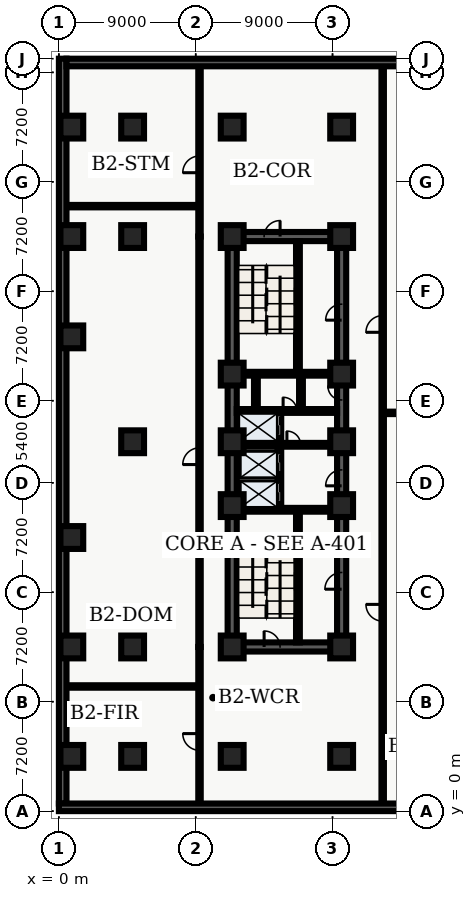
"""IFC4 building model, lengths in metres.
Left out: names, types, materials, properties, quantities, classifications, styles, units other than length and angle.
Written with IfcOpenShell. Run it as: python <this file> out.ifc"""

import sys

from ifc_helpers import new_model, entity, si_unit, converted_unit, direction, frame, origin_with_axes, origin_2d_with_axis, place, context, subcontext, project, spatial, polyline, rectangle, outline, extrude, element, fill, save


model = new_model("IFC4")
c1 = context("Model", 3, precision=1e-05, world=origin_with_axes(), true_north=direction((0.0, 1.0)))
c2 = subcontext(c1, "Body", "Model", "MODEL_VIEW")
j1 = project(units=[si_unit("LENGTHUNIT", "METRE"), converted_unit("PLANEANGLEUNIT", "DEGREE", entity("IfcPlaneAngleMeasure", 0.017), si_unit("PLANEANGLEUNIT", "RADIAN"), dimensions=[0, 0, 0, 0, 0, 0, 0])], contexts=[c1])
p1 = place(None, origin_with_axes())
s1 = spatial("IfcSite", under=j1, at=p1, CompositionType="ELEMENT")
p2 = place(p1, origin_with_axes())
s2 = spatial("IfcBuilding", under=s1, at=p2, CompositionType="ELEMENT")
p3 = place(p2, frame((0.0, 0.0, -10.2), z_axis=(0.0, 0.0, 1.0), x_axis=(1.0, 0.0, 0.0)))
s3 = spatial("IfcBuildingStorey", under=s2, at=p3, CompositionType="ELEMENT", Elevation=-10.2)
p4 = place(p3, frame((11.4, 10.8, 0.0), z_axis=(0.0, 0.0, 1.0), x_axis=(0.0, 1.0, 0.0)))
e1 = element("IfcWall", 1, at=p4, inside=s3, PredefinedType="SHEAR", context=c2, shape_type="SweptSolid", body=[
    extrude(outline(polyline([(0.0, -0.3), (27.0, -0.3), (27.0, 0.3), (0.0, 0.3), (0.0, -0.3)])), origin_with_axes(), (0.0, 0.0, 1.0), 5.08),
])
p5 = place(p3, frame((11.4, 10.8, 0.0), z_axis=(0.0, 0.0, 1.0), x_axis=(1.0, 0.0, 0.0)))
e2 = element("IfcWall", 2, at=p5, inside=s3, PredefinedType="SHEAR", context=c2, shape_type="SweptSolid", body=[
    extrude(outline(polyline([(0.0, -0.3), (7.2, -0.3), (7.2, 0.3), (0.0, 0.3), (0.0, -0.3)])), origin_with_axes(), (0.0, 0.0, 1.0), 5.08),
])
p6 = place(p5, frame((2.625, 0.0, 0.0), z_axis=(0.0, 0.0, 1.0), x_axis=(1.0, 0.0, 0.0)))
e3 = element("IfcOpeningElement", 3, at=p6, cuts=e2, PredefinedType="OPENING", context=c2, shape_type="SweptSolid", body=[
    extrude(rectangle(XDim=1.05, YDim=0.62, at=origin_2d_with_axis()), origin_with_axes(), (0.0, 0.0, 1.0), 2.15),
])
p7 = place(p3, frame((11.4, 37.8, 0.0), z_axis=(0.0, 0.0, 1.0), x_axis=(1.0, 0.0, 0.0)))
e4 = element("IfcWall", 4, at=p7, inside=s3, PredefinedType="SHEAR", context=c2, shape_type="SweptSolid", body=[
    extrude(outline(polyline([(0.0, -0.3), (7.2, -0.3), (7.2, 0.3), (0.0, 0.3), (0.0, -0.3)])), origin_with_axes(), (0.0, 0.0, 1.0), 5.08),
])
p8 = place(p7, frame((2.625, 0.0, 0.0), z_axis=(0.0, 0.0, 1.0), x_axis=(1.0, 0.0, 0.0)))
e5 = element("IfcOpeningElement", 5, at=p8, cuts=e4, PredefinedType="OPENING", context=c2, shape_type="SweptSolid", body=[
    extrude(rectangle(XDim=1.05, YDim=0.62, at=origin_2d_with_axis()), origin_with_axes(), (0.0, 0.0, 1.0), 2.15),
])
p9 = place(p3, frame((18.6, 10.8, 0.0), z_axis=(0.0, 0.0, 1.0), x_axis=(0.0, 1.0, 0.0)))
e6 = element("IfcWall", 6, at=p9, inside=s3, PredefinedType="SHEAR", context=c2, shape_type="SweptSolid", body=[
    extrude(outline(polyline([(0.0, -0.3), (13.5, -0.3), (13.5, 0.3), (0.0, 0.3), (0.0, -0.3)])), origin_with_axes(), (0.0, 0.0, 1.0), 5.08),
])
p10 = place(p9, frame((11.125, 0.0, 0.0), z_axis=(0.0, 0.0, 1.0), x_axis=(1.0, 0.0, 0.0)))
e7 = element("IfcOpeningElement", 7, at=p10, cuts=e6, PredefinedType="OPENING", context=c2, shape_type="SweptSolid", body=[
    extrude(rectangle(XDim=1.05, YDim=0.62, at=origin_2d_with_axis()), origin_with_axes(), (0.0, 0.0, 1.0), 2.15),
])
p11 = place(p9, frame((4.35, 0.0, 0.0), z_axis=(0.0, 0.0, 1.0), x_axis=(1.0, 0.0, 0.0)))
e8 = element("IfcOpeningElement", 8, at=p11, cuts=e6, PredefinedType="OPENING", context=c2, shape_type="SweptSolid", body=[
    extrude(rectangle(XDim=1.1, YDim=0.62, at=origin_2d_with_axis()), origin_with_axes(), (0.0, 0.0, 1.0), 2.15),
])
p12 = place(p3, frame((18.6, 24.3, 0.0), z_axis=(0.0, 0.0, 1.0), x_axis=(0.0, 1.0, 0.0)))
e9 = element("IfcWall", 9, at=p12, inside=s3, PredefinedType="SHEAR", context=c2, shape_type="SweptSolid", body=[
    extrude(outline(polyline([(0.0, -0.3), (13.5, -0.3), (13.5, 0.3), (0.0, 0.3), (0.0, -0.3)])), origin_with_axes(), (0.0, 0.0, 1.0), 5.08),
])
p13 = place(p12, frame((3.2, 0.0, 0.0), z_axis=(0.0, 0.0, 1.0), x_axis=(1.0, 0.0, 0.0)))
e10 = element("IfcOpeningElement", 10, at=p13, cuts=e9, PredefinedType="OPENING", context=c2, shape_type="SweptSolid", body=[
    extrude(rectangle(XDim=0.9, YDim=0.62, at=origin_2d_with_axis()), origin_with_axes(), (0.0, 0.0, 1.0), 2.15),
])
p14 = place(p12, frame((8.525, 0.0, 0.0), z_axis=(0.0, 0.0, 1.0), x_axis=(1.0, 0.0, 0.0)))
e11 = element("IfcOpeningElement", 11, at=p14, cuts=e9, PredefinedType="OPENING", context=c2, shape_type="SweptSolid", body=[
    extrude(rectangle(XDim=1.05, YDim=0.62, at=origin_2d_with_axis()), origin_with_axes(), (0.0, 0.0, 1.0), 2.15),
])
p15 = place(p3, frame((15.725, 11.1, 0.0), z_axis=(0.0, 0.0, 1.0), x_axis=(0.0, 1.0, 0.0)))
e12 = element("IfcWall", 12, at=p15, inside=s3, PredefinedType="SHEAR", context=c2, shape_type="SweptSolid", body=[
    extrude(outline(polyline([(0.0, -0.125), (8.6, -0.125), (8.6, 0.125), (0.0, 0.125), (0.0, -0.125)])), origin_with_axes(), (0.0, 0.0, 1.0), 5.08),
])
p16 = place(p3, frame((11.7, 19.825, 0.0), z_axis=(0.0, 0.0, 1.0), x_axis=(1.0, 0.0, 0.0)))
e13 = element("IfcWall", 13, at=p16, inside=s3, PredefinedType="SHEAR", context=c2, shape_type="SweptSolid", body=[
    extrude(outline(polyline([(0.0, -0.125), (6.6, -0.125), (6.6, 0.125), (0.0, 0.125), (0.0, -0.125)])), origin_with_axes(), (0.0, 0.0, 1.0), 5.08),
])
p17 = place(p3, frame((15.725, 28.9, 0.0), z_axis=(0.0, 0.0, 1.0), x_axis=(0.0, 1.0, 0.0)))
e14 = element("IfcWall", 14, at=p17, inside=s3, PredefinedType="SHEAR", context=c2, shape_type="SweptSolid", body=[
    extrude(outline(polyline([(0.0, -0.125), (8.6, -0.125), (8.6, 0.125), (0.0, 0.125), (0.0, -0.125)])), origin_with_axes(), (0.0, 0.0, 1.0), 5.08),
])
p18 = place(p3, frame((11.7, 28.775, 0.0), z_axis=(0.0, 0.0, 1.0), x_axis=(1.0, 0.0, 0.0)))
e15 = element("IfcWall", 15, at=p18, inside=s3, PredefinedType="SHEAR", context=c2, shape_type="SweptSolid", body=[
    extrude(outline(polyline([(0.0, -0.125), (6.6, -0.125), (6.6, 0.125), (0.0, 0.125), (0.0, -0.125)])), origin_with_axes(), (0.0, 0.0, 1.0), 5.08),
])
p19 = place(p3, frame((14.5, 19.95, 0.0), z_axis=(0.0, 0.0, 1.0), x_axis=(0.0, 1.0, 0.0)))
e16 = element("IfcWall", 16, at=p19, inside=s3, PredefinedType="SOLIDWALL", context=c2, shape_type="SweptSolid", body=[
    extrude(outline(polyline([(0.0, -0.125), (6.25, -0.125), (6.25, 0.125), (0.0, 0.125), (0.0, -0.125)])), origin_with_axes(), (0.0, 0.0, 1.0), 3.6),
])
p20 = place(p19, frame((1.025, 0.0, 0.0), z_axis=(0.0, 0.0, 1.0), x_axis=(1.0, 0.0, 0.0)))
e17 = element("IfcOpeningElement", 17, at=p20, cuts=e16, PredefinedType="OPENING", context=c2, shape_type="SweptSolid", body=[
    extrude(rectangle(XDim=1.1, YDim=0.27, at=origin_2d_with_axis()), origin_with_axes(), (0.0, 0.0, 1.0), 2.15),
])
p21 = place(p19, frame((2.975, 0.0, 0.0), z_axis=(0.0, 0.0, 1.0), x_axis=(1.0, 0.0, 0.0)))
e18 = element("IfcOpeningElement", 18, at=p21, cuts=e16, PredefinedType="OPENING", context=c2, shape_type="SweptSolid", body=[
    extrude(rectangle(XDim=1.1, YDim=0.27, at=origin_2d_with_axis()), origin_with_axes(), (0.0, 0.0, 1.0), 2.15),
])
p22 = place(p19, frame((5.425, 0.0, 0.0), z_axis=(0.0, 0.0, 1.0), x_axis=(1.0, 0.0, 0.0)))
e19 = element("IfcOpeningElement", 19, at=p22, cuts=e16, PredefinedType="OPENING", context=c2, shape_type="SweptSolid", body=[
    extrude(rectangle(XDim=1.2, YDim=0.27, at=origin_2d_with_axis()), origin_with_axes(), (0.0, 0.0, 1.0), 2.15),
])
p23 = place(p3, frame((11.7, 24.1, 0.0), z_axis=(0.0, 0.0, 1.0), x_axis=(1.0, 0.0, 0.0)))
e20 = element("IfcWall", 20, at=p23, inside=s3, PredefinedType="SOLIDWALL", context=c2, shape_type="SweptSolid", body=[
    extrude(outline(polyline([(0.0, -0.125), (6.6, -0.125), (6.6, 0.125), (0.0, 0.125), (0.0, -0.125)])), origin_with_axes(), (0.0, 0.0, 1.0), 3.6),
])
p24 = place(p23, frame((3.75, 0.0, 0.0), z_axis=(0.0, 0.0, 1.0), x_axis=(1.0, 0.0, 0.0)))
e21 = element("IfcOpeningElement", 21, at=p24, cuts=e20, PredefinedType="OPENING", context=c2, shape_type="SweptSolid", body=[
    extrude(rectangle(XDim=0.9, YDim=0.27, at=origin_2d_with_axis()), origin_with_axes(), (0.0, 0.0, 1.0), 2.15),
])
p25 = place(p3, frame((11.7, 26.325, 0.0), z_axis=(0.0, 0.0, 1.0), x_axis=(1.0, 0.0, 0.0)))
e22 = element("IfcWall", 22, at=p25, inside=s3, PredefinedType="SOLIDWALL", context=c2, shape_type="SweptSolid", body=[
    extrude(outline(polyline([(0.0, -0.125), (6.6, -0.125), (6.6, 0.125), (0.0, 0.125), (0.0, -0.125)])), origin_with_axes(), (0.0, 0.0, 1.0), 3.6),
])
p26 = place(p25, frame((3.5, 0.0, 0.0), z_axis=(0.0, 0.0, 1.0), x_axis=(1.0, 0.0, 0.0)))
e23 = element("IfcOpeningElement", 23, at=p26, cuts=e22, PredefinedType="OPENING", context=c2, shape_type="SweptSolid", body=[
    extrude(rectangle(XDim=0.9, YDim=0.27, at=origin_2d_with_axis()), origin_with_axes(), (0.0, 0.0, 1.0), 2.15),
])
for number, where, z_axis, x_axis in (
    (24, (12.96, 26.45, 0.0), (0.0, 0.0, 1.0), (0.0, 1.0, 0.0)),
    (25, (15.925, 26.45, 0.0), (0.0, 0.0, 1.0), (0.0, 1.0, 0.0)),
):
    element("IfcWall", number, at=place(p3, frame(where, z_axis=z_axis, x_axis=x_axis)), inside=s3, PredefinedType="SOLIDWALL", context=c2, shape_type="SweptSolid", body=[
        extrude(outline(polyline([(0.0, -0.125), (2.2, -0.125), (2.2, 0.125), (0.0, 0.125), (0.0, -0.125)])), origin_with_axes(), (0.0, 0.0, 1.0), 3.6),
    ])
for number, where, z_axis, x_axis in (
    (26, (11.4, 3.6, 0.0), (0.0, 0.0, 1.0), (1.0, 0.0, 0.0)),
    (27, (11.4, 10.8, 0.0), (0.0, 0.0, 1.0), (1.0, 0.0, 0.0)),
    (28, (11.4, 20.1, 0.0), (0.0, 0.0, 1.0), (1.0, 0.0, 0.0)),
    (29, (11.4, 24.3, 0.0), (0.0, 0.0, 1.0), (1.0, 0.0, 0.0)),
    (30, (11.4, 28.75, 0.0), (0.0, 0.0, 1.0), (1.0, 0.0, 0.0)),
    (31, (11.4, 37.8, 0.0), (0.0, 0.0, 1.0), (1.0, 0.0, 0.0)),
    (32, (11.4, 45.0, 0.0), (0.0, 0.0, 1.0), (1.0, 0.0, 0.0)),
    (33, (18.6, 3.6, 0.0), (0.0, 0.0, 1.0), (1.0, 0.0, 0.0)),
    (34, (18.6, 10.8, 0.0), (0.0, 0.0, 1.0), (1.0, 0.0, 0.0)),
    (35, (18.6, 20.1, 0.0), (0.0, 0.0, 1.0), (1.0, 0.0, 0.0)),
    (36, (18.6, 24.3, 0.0), (0.0, 0.0, 1.0), (1.0, 0.0, 0.0)),
    (37, (18.6, 28.75, 0.0), (0.0, 0.0, 1.0), (1.0, 0.0, 0.0)),
    (38, (18.6, 37.8, 0.0), (0.0, 0.0, 1.0), (1.0, 0.0, 0.0)),
    (39, (18.6, 45.0, 0.0), (0.0, 0.0, 1.0), (1.0, 0.0, 0.0)),
    (40, (4.85, 3.6, 0.0), (0.0, 0.0, 1.0), (1.0, 0.0, 0.0)),
    (41, (4.85, 10.8, 0.0), (0.0, 0.0, 1.0), (1.0, 0.0, 0.0)),
    (42, (4.85, 24.3, 0.0), (0.0, 0.0, 1.0), (1.0, 0.0, 0.0)),
    (43, (4.85, 37.8, 0.0), (0.0, 0.0, 1.0), (1.0, 0.0, 0.0)),
    (44, (4.85, 45.0, 0.0), (0.0, 0.0, 1.0), (1.0, 0.0, 0.0)),
    (45, (0.85, 3.6, 0.0), (0.0, 0.0, 1.0), (1.0, 0.0, 0.0)),
    (46, (0.85, 10.8, 0.0), (0.0, 0.0, 1.0), (1.0, 0.0, 0.0)),
    (47, (0.85, 18.0, 0.0), (0.0, 0.0, 1.0), (1.0, 0.0, 0.0)),
    (48, (0.85, 31.2, 0.0), (0.0, 0.0, 1.0), (1.0, 0.0, 0.0)),
    (49, (0.85, 37.8, 0.0), (0.0, 0.0, 1.0), (1.0, 0.0, 0.0)),
    (50, (0.85, 45.0, 0.0), (0.0, 0.0, 1.0), (1.0, 0.0, 0.0)),
):
    element("IfcColumn", number, at=place(p3, frame(where, z_axis=z_axis, x_axis=x_axis)), inside=s3, PredefinedType="COLUMN", context=c2, shape_type="SweptSolid", body=[
        extrude(rectangle(XDim=1.5, YDim=1.5, at=origin_2d_with_axis()), origin_with_axes(), (0.0, 0.0, 1.0), 5.4),
    ])
p27 = place(p3, frame((9.25, 0.5, 0.0), z_axis=(0.0, 0.0, 1.0), x_axis=(0.0, 1.0, 0.0)))
e51 = element("IfcWall", 51, at=p27, inside=s3, PredefinedType="PARTITIONING", context=c2, shape_type="SweptSolid", body=[
    extrude(outline(polyline([(0.0, -0.08), (10.3, -0.08), (10.3, 0.08), (0.0, 0.08), (0.0, -0.08)])), origin_with_axes(), (0.0, 0.0, 1.0), 3.2),
])
p28 = place(p27, frame((4.05, 0.0, 0.0), z_axis=(0.0, 0.0, 1.0), x_axis=(1.0, 0.0, 0.0)))
e52 = element("IfcOpeningElement", 52, at=p28, cuts=e51, PredefinedType="OPENING", context=c2, shape_type="SweptSolid", body=[
    extrude(rectangle(XDim=1.1, YDim=0.18, at=origin_2d_with_axis()), origin_with_axes(), (0.0, 0.0, 1.0), 2.15),
])
p29 = place(p3, frame((9.25, 37.8, 0.0), z_axis=(0.0, 0.0, 1.0), x_axis=(0.0, 1.0, 0.0)))
e53 = element("IfcWall", 53, at=p29, inside=s3, PredefinedType="PARTITIONING", context=c2, shape_type="SweptSolid", body=[
    extrude(outline(polyline([(0.0, -0.08), (11.2, -0.08), (11.2, 0.08), (0.0, 0.08), (0.0, -0.08)])), origin_with_axes(), (0.0, 0.0, 1.0), 3.2),
])
p30 = place(p29, frame((4.75, 0.0, 0.0), z_axis=(0.0, 0.0, 1.0), x_axis=(1.0, 0.0, 0.0)))
e54 = element("IfcOpeningElement", 54, at=p30, cuts=e53, PredefinedType="OPENING", context=c2, shape_type="SweptSolid", body=[
    extrude(rectangle(XDim=1.1, YDim=0.18, at=origin_2d_with_axis()), origin_with_axes(), (0.0, 0.0, 1.0), 2.15),
])
p31 = place(p3, frame((9.25, 10.8, 0.0), z_axis=(0.0, 0.0, 1.0), x_axis=(0.0, 1.0, 0.0)))
e55 = element("IfcWall", 55, at=p31, inside=s3, PredefinedType="PARTITIONING", context=c2, shape_type="SweptSolid", body=[
    extrude(outline(polyline([(0.0, -0.08), (27.0, -0.08), (27.0, 0.08), (0.0, 0.08), (0.0, -0.08)])), origin_with_axes(), (0.0, 0.0, 1.0), 3.2),
])
p32 = place(p31, frame((12.55, 0.0, 0.0), z_axis=(0.0, 0.0, 1.0), x_axis=(1.0, 0.0, 0.0)))
e56 = element("IfcOpeningElement", 56, at=p32, cuts=e55, PredefinedType="OPENING", context=c2, shape_type="SweptSolid", body=[
    extrude(rectangle(XDim=1.1, YDim=0.18, at=origin_2d_with_axis()), origin_with_axes(), (0.0, 0.0, 1.0), 2.15),
])
p33 = place(p3, frame((21.3, 0.5, 0.0), z_axis=(0.0, 0.0, 1.0), x_axis=(0.0, 1.0, 0.0)))
e57 = element("IfcWall", 57, at=p33, inside=s3, PredefinedType="PARTITIONING", context=c2, shape_type="SweptSolid", body=[
    extrude(outline(polyline([(0.0, -0.08), (48.5, -0.08), (48.5, 0.08), (0.0, 0.08), (0.0, -0.08)])), origin_with_axes(), (0.0, 0.0, 1.0), 3.2),
])
p34 = place(p33, frame((31.55, 0.0, 0.0), z_axis=(0.0, 0.0, 1.0), x_axis=(1.0, 0.0, 0.0)))
e58 = element("IfcOpeningElement", 58, at=p34, cuts=e57, PredefinedType="OPENING", context=c2, shape_type="SweptSolid", body=[
    extrude(rectangle(XDim=1.1, YDim=0.18, at=origin_2d_with_axis()), origin_with_axes(), (0.0, 0.0, 1.0), 2.15),
])
p35 = place(p33, frame((12.55, 0.0, 0.0), z_axis=(0.0, 0.0, 1.0), x_axis=(1.0, 0.0, 0.0)))
e59 = element("IfcOpeningElement", 59, at=p35, cuts=e57, PredefinedType="OPENING", context=c2, shape_type="SweptSolid", body=[
    extrude(rectangle(XDim=1.1, YDim=0.18, at=origin_2d_with_axis()), origin_with_axes(), (0.0, 0.0, 1.0), 2.15),
])
p36 = place(p3, frame((21.3, 26.2, 0.0), z_axis=(0.0, 0.0, 1.0), x_axis=(1.0, 0.0, 0.0)))
e60 = element("IfcWall", 60, at=p36, inside=s3, PredefinedType="PARTITIONING", context=c2, shape_type="SweptSolid", body=[
    extrude(outline(polyline([(0.0, -0.08), (61.6, -0.08), (61.6, 0.08), (0.0, 0.08), (0.0, -0.08)])), origin_with_axes(), (0.0, 0.0, 1.0), 3.2),
])
p37 = place(p36, frame((34.55, 0.0, 0.0), z_axis=(0.0, 0.0, 1.0), x_axis=(1.0, 0.0, 0.0)))
e61 = element("IfcOpeningElement", 61, at=p37, cuts=e60, PredefinedType="OPENING", context=c2, shape_type="SweptSolid", body=[
    extrude(rectangle(XDim=1.1, YDim=0.18, at=origin_2d_with_axis()), origin_with_axes(), (0.0, 0.0, 1.0), 2.15),
])
for number, where, z_axis, x_axis in (
    (62, (0.5, 8.2, 0.0), (0.0, 0.0, 1.0), (1.0, 0.0, 0.0)),
    (63, (0.5, 39.8, 0.0), (0.0, 0.0, 1.0), (1.0, 0.0, 0.0)),
):
    element("IfcWall", number, at=place(p3, frame(where, z_axis=z_axis, x_axis=x_axis)), inside=s3, PredefinedType="PARTITIONING", context=c2, shape_type="SweptSolid", body=[
        extrude(outline(polyline([(0.0, -0.08), (8.75, -0.08), (8.75, 0.08), (0.0, 0.08), (0.0, -0.08)])), origin_with_axes(), (0.0, 0.0, 1.0), 3.2),
    ])
p38 = place(p3, frame((0.25, 0.5, 0.0), z_axis=(0.0, 0.0, 1.0), x_axis=(0.0, 1.0, 0.0)))
e64 = element("IfcWall", 64, at=p38, inside=s3, PredefinedType="USERDEFINED", context=c2, shape_type="SweptSolid", body=[
    extrude(outline(polyline([(0.0, -0.25), (49.0, -0.25), (49.0, 0.25), (0.0, 0.25), (0.0, -0.25)])), origin_with_axes(), (0.0, 0.0, 1.0), 5.08),
])
for number, where, z_axis, x_axis in (
    (65, (0.5, 49.25, 0.0), (0.0, 0.0, 1.0), (1.0, 0.0, 0.0)),
    (66, (82.9, 0.25, 0.0), (0.0, 0.0, 1.0), (-1.0, 0.0, 0.0)),
):
    element("IfcWall", number, at=place(p3, frame(where, z_axis=z_axis, x_axis=x_axis)), inside=s3, PredefinedType="USERDEFINED", context=c2, shape_type="SweptSolid", body=[
        extrude(outline(polyline([(0.0, -0.25), (82.9, -0.25), (82.9, 0.25), (0.0, 0.25), (0.0, -0.25)])), origin_with_axes(), (0.0, 0.0, 1.0), 5.08),
    ])
p39 = place(p19, frame((1.025, 0.0, 0.0), z_axis=(0.0, 0.0, 1.0), x_axis=(1.0, 0.0, 0.0)))
e67 = element("IfcDoor", 67, at=p39, inside=s3, OperationType="SLIDING_TO_LEFT", PredefinedType="DOOR", context=c2, shape_type="SweptSolid", body=[
    extrude(rectangle(XDim=1.1, YDim=0.09, at=origin_2d_with_axis()), origin_with_axes(), (0.0, 0.0, 1.0), 2.15),
])
fill(e17, e67)
p40 = place(p19, frame((2.975, 0.0, 0.0), z_axis=(0.0, 0.0, 1.0), x_axis=(1.0, 0.0, 0.0)))
e68 = element("IfcDoor", 68, at=p40, inside=s3, OperationType="SLIDING_TO_RIGHT", PredefinedType="DOOR", context=c2, shape_type="SweptSolid", body=[
    extrude(rectangle(XDim=1.1, YDim=0.09, at=origin_2d_with_axis()), origin_with_axes(), (0.0, 0.0, 1.0), 2.15),
])
fill(e18, e68)
p41 = place(p19, frame((5.425, 0.0, 0.0), z_axis=(0.0, 0.0, 1.0), x_axis=(1.0, 0.0, 0.0)))
e69 = element("IfcDoor", 69, at=p41, inside=s3, OperationType="DOUBLE_DOOR_SLIDING", PredefinedType="DOOR", context=c2, shape_type="SweptSolid", body=[
    extrude(rectangle(XDim=1.2, YDim=0.09, at=origin_2d_with_axis()), origin_with_axes(), (0.0, 0.0, 1.0), 2.15),
])
fill(e19, e69)
p42 = place(p12, frame((3.2, 0.0, 0.0), z_axis=(0.0, 0.0, 1.0), x_axis=(1.0, 0.0, 0.0)))
e70 = element("IfcDoor", 70, at=p42, inside=s3, OperationType="SINGLE_SWING_RIGHT", PredefinedType="DOOR", context=c2, shape_type="SweptSolid", body=[
    extrude(rectangle(XDim=0.9, YDim=0.09, at=origin_2d_with_axis()), origin_with_axes(), (0.0, 0.0, 1.0), 2.15),
])
fill(e10, e70)
p43 = place(p5, frame((2.625, 0.0, 0.0), z_axis=(0.0, 0.0, 1.0), x_axis=(1.0, 0.0, 0.0)))
e71 = element("IfcDoor", 71, at=p43, inside=s3, OperationType="SINGLE_SWING_LEFT", PredefinedType="DOOR", context=c2, shape_type="SweptSolid", body=[
    extrude(rectangle(XDim=1.05, YDim=0.09, at=origin_2d_with_axis()), origin_with_axes(), (0.0, 0.0, 1.0), 2.15),
])
fill(e3, e71)
p44 = place(p7, frame((2.625, 0.0, 0.0), z_axis=(0.0, 0.0, 1.0), x_axis=(1.0, 0.0, 0.0)))
e72 = element("IfcDoor", 72, at=p44, inside=s3, OperationType="SINGLE_SWING_RIGHT", PredefinedType="DOOR", context=c2, shape_type="SweptSolid", body=[
    extrude(rectangle(XDim=1.05, YDim=0.09, at=origin_2d_with_axis()), origin_with_axes(), (0.0, 0.0, 1.0), 2.15),
])
fill(e5, e72)
p45 = place(p9, frame((11.125, 0.0, 0.0), z_axis=(0.0, 0.0, 1.0), x_axis=(1.0, 0.0, 0.0)))
e73 = element("IfcDoor", 73, at=p45, inside=s3, OperationType="SINGLE_SWING_LEFT", PredefinedType="DOOR", context=c2, shape_type="SweptSolid", body=[
    extrude(rectangle(XDim=1.05, YDim=0.09, at=origin_2d_with_axis()), origin_with_axes(), (0.0, 0.0, 1.0), 2.15),
])
fill(e7, e73)
p46 = place(p23, frame((3.75, 0.0, 0.0), z_axis=(0.0, 0.0, 1.0), x_axis=(1.0, 0.0, 0.0)))
e74 = element("IfcDoor", 74, at=p46, inside=s3, OperationType="SINGLE_SWING_LEFT", PredefinedType="DOOR", context=c2, shape_type="SweptSolid", body=[
    extrude(rectangle(XDim=0.9, YDim=0.09, at=origin_2d_with_axis()), origin_with_axes(), (0.0, 0.0, 1.0), 2.15),
])
fill(e21, e74)
p47 = place(p25, frame((3.5, 0.0, 0.0), z_axis=(0.0, 0.0, 1.0), x_axis=(1.0, 0.0, 0.0)))
e75 = element("IfcDoor", 75, at=p47, inside=s3, OperationType="SINGLE_SWING_LEFT", PredefinedType="DOOR", context=c2, shape_type="SweptSolid", body=[
    extrude(rectangle(XDim=0.9, YDim=0.09, at=origin_2d_with_axis()), origin_with_axes(), (0.0, 0.0, 1.0), 2.15),
])
fill(e23, e75)
p48 = place(p9, frame((4.35, 0.0, 0.0), z_axis=(0.0, 0.0, 1.0), x_axis=(1.0, 0.0, 0.0)))
e76 = element("IfcDoor", 76, at=p48, inside=s3, OperationType="SINGLE_SWING_LEFT", PredefinedType="DOOR", context=c2, shape_type="SweptSolid", body=[
    extrude(rectangle(XDim=1.1, YDim=0.09, at=origin_2d_with_axis()), origin_with_axes(), (0.0, 0.0, 1.0), 2.15),
])
fill(e8, e76)
p49 = place(p12, frame((8.525, 0.0, 0.0), z_axis=(0.0, 0.0, 1.0), x_axis=(1.0, 0.0, 0.0)))
e77 = element("IfcDoor", 77, at=p49, inside=s3, OperationType="SINGLE_SWING_LEFT", PredefinedType="DOOR", context=c2, shape_type="SweptSolid", body=[
    extrude(rectangle(XDim=1.05, YDim=0.09, at=origin_2d_with_axis()), origin_with_axes(), (0.0, 0.0, 1.0), 2.15),
])
fill(e11, e77)
p50 = place(p33, frame((31.55, 0.0, 0.0), z_axis=(0.0, 0.0, 1.0), x_axis=(1.0, 0.0, 0.0)))
e78 = element("IfcDoor", 78, at=p50, inside=s3, OperationType="SINGLE_SWING_LEFT", PredefinedType="DOOR", context=c2, shape_type="SweptSolid", body=[
    extrude(rectangle(XDim=1.1, YDim=0.09, at=origin_2d_with_axis()), origin_with_axes(), (0.0, 0.0, 1.0), 2.15),
])
fill(e58, e78)
p51 = place(p27, frame((4.05, 0.0, 0.0), z_axis=(0.0, 0.0, 1.0), x_axis=(1.0, 0.0, 0.0)))
e79 = element("IfcDoor", 79, at=p51, inside=s3, OperationType="SINGLE_SWING_RIGHT", PredefinedType="DOOR", context=c2, shape_type="SweptSolid", body=[
    extrude(rectangle(XDim=1.1, YDim=0.09, at=origin_2d_with_axis()), origin_with_axes(), (0.0, 0.0, 1.0), 2.15),
])
fill(e52, e79)
p52 = place(p31, frame((12.55, 0.0, 0.0), z_axis=(0.0, 0.0, 1.0), x_axis=(1.0, 0.0, 0.0)))
e80 = element("IfcDoor", 80, at=p52, inside=s3, OperationType="SINGLE_SWING_LEFT", PredefinedType="DOOR", context=c2, shape_type="SweptSolid", body=[
    extrude(rectangle(XDim=1.1, YDim=0.09, at=origin_2d_with_axis()), origin_with_axes(), (0.0, 0.0, 1.0), 2.15),
])
fill(e56, e80)
p53 = place(p29, frame((4.75, 0.0, 0.0), z_axis=(0.0, 0.0, 1.0), x_axis=(1.0, 0.0, 0.0)))
e81 = element("IfcDoor", 81, at=p53, inside=s3, OperationType="SINGLE_SWING_LEFT", PredefinedType="DOOR", context=c2, shape_type="SweptSolid", body=[
    extrude(rectangle(XDim=1.1, YDim=0.09, at=origin_2d_with_axis()), origin_with_axes(), (0.0, 0.0, 1.0), 2.15),
])
fill(e54, e81)
p54 = place(p33, frame((12.55, 0.0, 0.0), z_axis=(0.0, 0.0, 1.0), x_axis=(1.0, 0.0, 0.0)))
e82 = element("IfcDoor", 82, at=p54, inside=s3, OperationType="SINGLE_SWING_RIGHT", PredefinedType="DOOR", context=c2, shape_type="SweptSolid", body=[
    extrude(rectangle(XDim=1.1, YDim=0.09, at=origin_2d_with_axis()), origin_with_axes(), (0.0, 0.0, 1.0), 2.15),
])
fill(e59, e82)
save(model, sys.argv[1])
